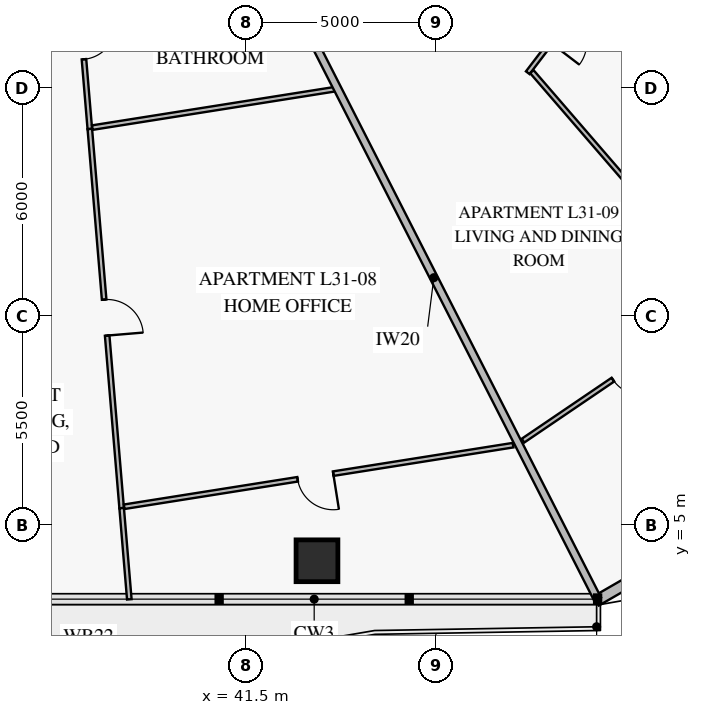
"""IFC4 building model, lengths in metres.
Left out: names, types, materials, properties, quantities, classifications, styles, units other than length and angle.
Written with IfcOpenShell. Run it as: python <this file> out.ifc"""

import sys

from ifc_helpers import new_model, si_unit, direction, frame, frame_2d, origin, origin_2d, place, context, subcontext, project, spatial, rectangle, extrude, element, fill, save


model = new_model("IFC4")
c1 = context("Model", 3, precision=1e-05, world=origin(), true_north=direction((0.0, 1.0)))
c2 = subcontext(c1, "Body", "Model", "MODEL_VIEW")
j1 = project(units=[si_unit("LENGTHUNIT", "METRE"), si_unit("PLANEANGLEUNIT", "RADIAN")], contexts=[c1])
p1 = place(None, origin())
s1 = spatial("IfcSite", under=j1, at=p1, CompositionType="ELEMENT")
p2 = place(p1, origin())
s2 = spatial("IfcBuilding", under=s1, at=p2, CompositionType="ELEMENT")
p3 = place(p2, frame((0.0, 0.0, 126.6)))
s3 = spatial("IfcBuildingStorey", under=s2, at=p3, CompositionType="ELEMENT", Elevation=126.6)
p4 = place(p3, frame((43.37, 4.052, 0.0), z_axis=(0.0, 0.0, 1.0), x_axis=(1.0, 0.0, 0.0)))
e1 = element("IfcColumn", 1, at=p4, inside=s3, PredefinedType="COLUMN", context=c2, shape_type="SweptSolid", body=[
    extrude(rectangle(XDim=1.1, YDim=1.1, at=origin_2d()), origin(), (0.0, 0.0, 1.0), 3.55),
])
p5 = place(p3, frame((53.761, 4.751, 0.0), z_axis=(0.0, 0.0, 1.0), x_axis=(-0.866007452331, -0.500031091541, 0.0)))
e2 = element("IfcWall", 2, at=p5, inside=s3, PredefinedType="SOLIDWALL", context=c2, shape_type="SweptSolid", body=[
    extrude(rectangle(XDim=3.515, YDim=0.28, at=frame_2d((1.757, 0.0))), origin(), (0.0, 0.0, 1.0), 3.55),
])
p6 = place(p3, frame((37.062, 19.35, 0.0), z_axis=(0.0, 0.0, 1.0), x_axis=(0.083695140781, -0.996491406591, 0.0)))
e3 = element("IfcWall", 3, at=p6, inside=s3, PredefinedType="PARTITIONING", context=c2, shape_type="SweptSolid", body=[
    extrude(rectangle(XDim=3.95, YDim=0.12, at=frame_2d((1.975, 0.0))), origin(), (0.0, 0.0, 1.0), 3.55),
])
p7 = place(p6, frame((1.209, 0.0, 0.0)))
e4 = element("IfcOpeningElement", 4, at=p7, cuts=e3, PredefinedType="OPENING", context=c2, shape_type="SweptSolid", body=[
    extrude(rectangle(XDim=0.9, YDim=2.1, at=frame_2d((0.45, 1.05))), frame((0.0, 0.072, 0.0), z_axis=(0.0, -1.0, 0.0), x_axis=(1.0, 0.0, 0.0)), (0.0, 0.0, 1.0), 0.144),
])
p8 = place(p3, frame((37.393, 15.414, 0.0), z_axis=(0.0, 0.0, 1.0), x_axis=(0.083660945701, -0.996494278039, 0.0)))
e5 = element("IfcWall", 5, at=p8, inside=s3, PredefinedType="PARTITIONING", context=c2, shape_type="SweptSolid", body=[
    extrude(rectangle(XDim=10.012, YDim=0.12, at=frame_2d((5.006, 0.0))), origin(), (0.0, 0.0, 1.0), 3.1),
])
p9 = place(p8, frame((4.506, 0.0, 0.0)))
e6 = element("IfcOpeningElement", 6, at=p9, cuts=e5, PredefinedType="OPENING", context=c2, shape_type="SweptSolid", body=[
    extrude(rectangle(XDim=0.95, YDim=2.1, at=frame_2d((0.475, 1.05))), frame((0.0, 0.072, 0.0), z_axis=(0.0, -1.0, 0.0), x_axis=(1.0, 0.0, 0.0)), (0.0, 0.0, 1.0), 0.144),
])
p10 = place(p3, frame((38.296, 5.473, 0.0), z_axis=(0.0, 0.0, 1.0), x_axis=(0.987688342725, 0.156434451591, 0.0)))
e7 = element("IfcWall", 7, at=p10, inside=s3, PredefinedType="PARTITIONING", context=c2, shape_type="SweptSolid", body=[
    extrude(rectangle(XDim=10.361, YDim=0.12, at=frame_2d((5.181, 0.0))), origin(), (0.0, 0.0, 1.0), 2.8),
])
p11 = place(p10, frame((4.622, 0.0, 0.0)))
e8 = element("IfcOpeningElement", 8, at=p11, cuts=e7, PredefinedType="OPENING", context=c2, shape_type="SweptSolid", body=[
    extrude(rectangle(XDim=0.95, YDim=2.1, at=frame_2d((0.475, 1.05))), frame((0.0, 0.072, 0.0), z_axis=(0.0, -1.0, 0.0), x_axis=(1.0, 0.0, 0.0)), (0.0, 0.0, 1.0), 0.144),
])
p12 = place(p3, frame((48.791, 7.212, 0.0), z_axis=(0.0, 0.0, 1.0), x_axis=(0.82746544618, 0.561516638559, 0.0)))
e9 = element("IfcWall", 9, at=p12, inside=s3, PredefinedType="PARTITIONING", context=c2, shape_type="SweptSolid", body=[
    extrude(rectangle(XDim=6.668, YDim=0.12, at=frame_2d((3.334, 0.0))), origin(), (0.0, 0.0, 1.0), 2.8),
])
p13 = place(p12, frame((2.859, 0.0, 0.0)))
e10 = element("IfcOpeningElement", 10, at=p13, cuts=e9, PredefinedType="OPENING", context=c2, shape_type="SweptSolid", body=[
    extrude(rectangle(XDim=0.95, YDim=2.1, at=frame_2d((0.475, 1.05))), frame((0.0, 0.072, 0.0), z_axis=(0.0, -1.0, 0.0), x_axis=(1.0, 0.0, 0.0)), (0.0, 0.0, 1.0), 0.144),
])
p14 = place(p3, frame((48.917, 16.894, 0.0), z_axis=(0.0, 0.0, 1.0), x_axis=(0.606532810855, 0.795058456566, 0.0)))
e11 = element("IfcWall", 11, at=p14, inside=s3, PredefinedType="PARTITIONING", context=c2, shape_type="SweptSolid", body=[
    extrude(rectangle(XDim=8.352, YDim=0.12, at=frame_2d((4.176, 0.0))), origin(), (0.0, 0.0, 1.0), 2.85),
])
p15 = place(p14, frame((0.993, 0.0, 0.0)))
e12 = element("IfcOpeningElement", 12, at=p15, cuts=e11, PredefinedType="OPENING", context=c2, shape_type="SweptSolid", body=[
    extrude(rectangle(XDim=0.95, YDim=2.1, at=frame_2d((0.475, 1.05))), frame((0.0, 0.072, 0.0), z_axis=(0.0, -1.0, 0.0), x_axis=(1.0, 0.0, 0.0)), (0.0, 0.0, 1.0), 0.144),
])
p16 = place(p14, frame((3.701, 0.0, 0.0)))
e13 = element("IfcOpeningElement", 13, at=p16, cuts=e11, PredefinedType="OPENING", context=c2, shape_type="SweptSolid", body=[
    extrude(rectangle(XDim=0.95, YDim=2.1, at=frame_2d((0.475, 1.05))), frame((0.0, 0.072, 0.0), z_axis=(0.0, -1.0, 0.0), x_axis=(1.0, 0.0, 0.0)), (0.0, 0.0, 1.0), 0.144),
])
p17 = place(p14, frame((6.409, 0.0, 0.0)))
e14 = element("IfcOpeningElement", 14, at=p17, cuts=e11, PredefinedType="OPENING", context=c2, shape_type="SweptSolid", body=[
    extrude(rectangle(XDim=0.95, YDim=2.1, at=frame_2d((0.475, 1.05))), frame((0.0, 0.072, 0.0), z_axis=(0.0, -1.0, 0.0), x_axis=(1.0, 0.0, 0.0)), (0.0, 0.0, 1.0), 0.144),
])
p18 = place(p3, frame((38.231, 5.437, 0.0), z_axis=(0.0, 0.0, 1.0), x_axis=(0.083615836345, -0.996498064179, 0.0)))
e15 = element("IfcWall", 15, at=p18, inside=s3, PredefinedType="PARTITIONING", context=c2, shape_type="SweptSolid", body=[
    extrude(rectangle(XDim=2.409, YDim=0.12, at=frame_2d((1.205, 0.0))), origin(), (0.0, 0.0, 1.0), 2.8),
])
p19 = place(p3, frame((37.458, 15.45, 0.0), z_axis=(0.0, 0.0, 1.0), x_axis=(0.987687698578, 0.156438518521, 0.0)))
e16 = element("IfcWall", 16, at=p19, inside=s3, PredefinedType="PARTITIONING", context=c2, shape_type="SweptSolid", body=[
    extrude(rectangle(XDim=6.48, YDim=0.12, at=frame_2d((3.24, 0.0))), origin(), (0.0, 0.0, 1.0), 2.85),
])
p20 = place(p3, frame((42.135, 19.96, 0.0), z_axis=(0.0, 0.0, 1.0), x_axis=(0.453989534113, -0.891007016199, 0.0)))
e17 = element("IfcWall", 17, at=p20, inside=s3, PredefinedType="PARTITIONING", context=c2, shape_type="SweptSolid", body=[
    extrude(rectangle(XDim=18.988, YDim=0.2, at=frame_2d((9.494, 0.0))), origin(), (0.0, 0.0, 1.0), 2.8),
])
p21 = place(p3, frame((50.687, 19.103, 0.0), z_axis=(0.0, 0.0, 1.0), x_axis=(0.75142693105, -0.659816313297, 0.0)))
e18 = element("IfcWall", 18, at=p21, inside=s3, PredefinedType="PARTITIONING", context=c2, shape_type="SweptSolid", body=[
    extrude(rectangle(XDim=9.994, YDim=0.12, at=frame_2d((4.997, 0.0))), origin(), (0.0, 0.0, 1.0), 2.8),
])
p22 = place(p3, frame((49.024, 16.923, 0.0), z_axis=(0.0, 0.0, 1.0), x_axis=(0.653686738758, -0.756765252619, 0.0)))
e19 = element("IfcWall", 19, at=p22, inside=s3, PredefinedType="PARTITIONING", context=c2, shape_type="SweptSolid", body=[
    extrude(rectangle(XDim=7.889, YDim=0.12, at=frame_2d((3.945, 0.0))), origin(), (0.0, 0.0, 1.0), 3.1),
])
p23 = place(p7, origin())
e20 = element("IfcDoor", 20, at=p23, inside=s3, OperationType="SINGLE_SWING_LEFT", PredefinedType="DOOR", context=c2, shape_type="SweptSolid", body=[
    extrude(rectangle(XDim=0.9, YDim=2.1, at=frame_2d((0.45, 1.05))), frame((0.0, 0.025, 0.0), z_axis=(0.0, -1.0, 0.0), x_axis=(1.0, 0.0, 0.0)), (0.0, 0.0, 1.0), 0.05),
])
fill(e4, e20)
p24 = place(p9, origin())
e21 = element("IfcDoor", 21, at=p24, inside=s3, OperationType="SINGLE_SWING_RIGHT", PredefinedType="DOOR", context=c2, shape_type="SweptSolid", body=[
    extrude(rectangle(XDim=0.95, YDim=2.1, at=frame_2d((0.475, 1.05))), frame((0.0, 0.025, 0.0), z_axis=(0.0, -1.0, 0.0), x_axis=(1.0, 0.0, 0.0)), (0.0, 0.0, 1.0), 0.05),
])
fill(e6, e21)
p25 = place(p11, frame((0.95, 0.0, 0.0), z_axis=(0.0, 0.0, 1.0), x_axis=(-1.0, 0.0, 0.0)))
e22 = element("IfcDoor", 22, at=p25, inside=s3, OperationType="SINGLE_SWING_LEFT", PredefinedType="DOOR", context=c2, shape_type="SweptSolid", body=[
    extrude(rectangle(XDim=0.95, YDim=2.1, at=frame_2d((0.475, 1.05))), frame((0.0, 0.025, 0.0), z_axis=(0.0, -1.0, 0.0), x_axis=(1.0, 0.0, 0.0)), (0.0, 0.0, 1.0), 0.05),
])
fill(e8, e22)
p26 = place(p13, frame((0.95, 0.0, 0.0), z_axis=(0.0, 0.0, 1.0), x_axis=(-1.0, 0.0, 0.0)))
e23 = element("IfcDoor", 23, at=p26, inside=s3, OperationType="SINGLE_SWING_LEFT", PredefinedType="DOOR", context=c2, shape_type="SweptSolid", body=[
    extrude(rectangle(XDim=0.95, YDim=2.1, at=frame_2d((0.475, 1.05))), frame((0.0, 0.025, 0.0), z_axis=(0.0, -1.0, 0.0), x_axis=(1.0, 0.0, 0.0)), (0.0, 0.0, 1.0), 0.05),
])
fill(e10, e23)
save(model, sys.argv[1])
